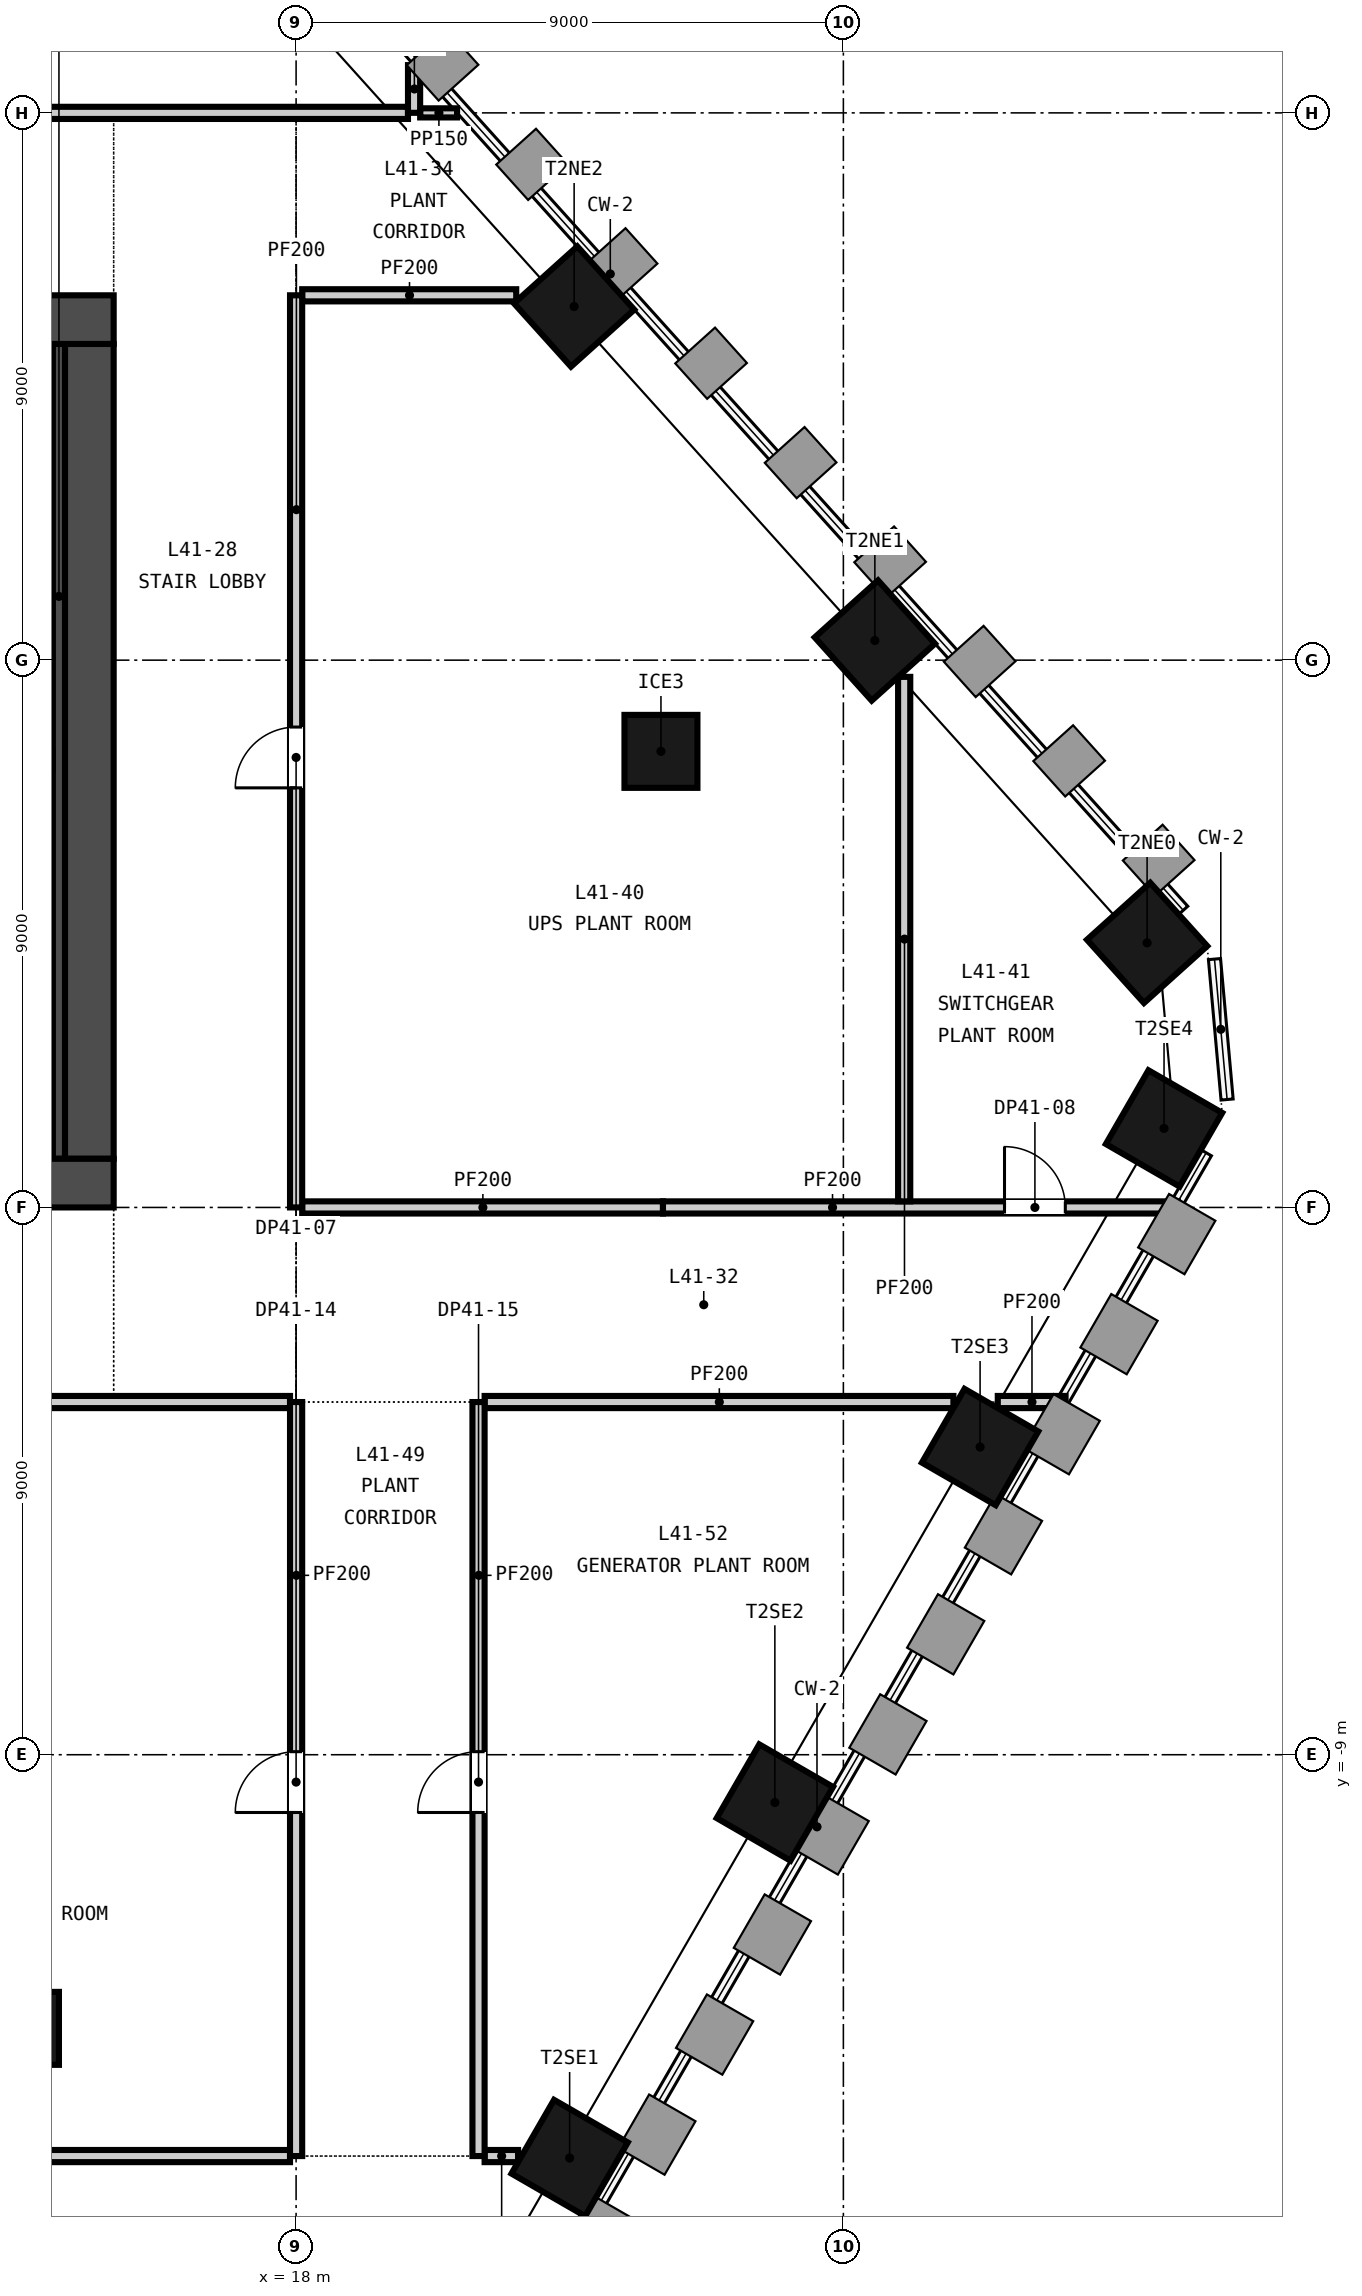
"""IFC4 building model, lengths in metres.
Left out: names, types, materials, properties, quantities, classifications, styles, units other than length and angle.
Written with IfcOpenShell. Run it as: python <this file> out.ifc"""

import sys

from ifc_helpers import new_model, si_unit, direction, frame, frame_2d, origin, origin_2d, place, context, subcontext, project, spatial, rectangle, extrude, element, fill, save


model = new_model("IFC4")
c1 = context("Model", 3, precision=1e-05, world=origin(), true_north=direction((0.0, 1.0)))
c2 = subcontext(c1, "Body", "Model", "MODEL_VIEW")
j1 = project(units=[si_unit("LENGTHUNIT", "METRE"), si_unit("PLANEANGLEUNIT", "RADIAN")], contexts=[c1])
p1 = place(None, origin())
s1 = spatial("IfcSite", under=j1, at=p1, CompositionType="ELEMENT")
p2 = place(p1, origin())
s2 = spatial("IfcBuilding", under=s1, at=p2, CompositionType="ELEMENT")
p3 = place(p2, frame((0.0, 0.0, 166.3)))
s3 = spatial("IfcBuildingStorey", under=s2, at=p3, CompositionType="ELEMENT", Elevation=166.3)
p4 = place(p3, frame((-15.0, 0.4, -0.3), z_axis=(0.0, 0.0, 1.0), x_axis=(1.0, 0.0, 0.0)))
e1 = element("IfcWall", 1, at=p4, inside=s3, PredefinedType="SOLIDWALL", context=c2, shape_type="SweptSolid", body=[
    extrude(rectangle(XDim=30.0, YDim=0.8, at=frame_2d((15.0, 0.0))), origin(), (0.0, 0.0, 1.0), 4.65),
])
p5 = place(p4, frame((5.8, 0.0, 0.3)))
e2 = element("IfcOpeningElement", 2, at=p5, cuts=e1, PredefinedType="OPENING", context=c2, shape_type="SweptSolid", body=[
    extrude(rectangle(XDim=2.4, YDim=2.4, at=frame_2d((1.2, 1.2))), frame((0.0, 0.41, 0.0), z_axis=(0.0, -1.0, 0.0), x_axis=(1.0, 0.0, 0.0)), (0.0, 0.0, 1.0), 0.82),
])
p6 = place(p4, frame((13.8, 0.0, 0.3)))
e3 = element("IfcOpeningElement", 3, at=p6, cuts=e1, PredefinedType="OPENING", context=c2, shape_type="SweptSolid", body=[
    extrude(rectangle(XDim=2.4, YDim=2.4, at=frame_2d((1.2, 1.2))), frame((0.0, 0.41, 0.0), z_axis=(0.0, -1.0, 0.0), x_axis=(1.0, 0.0, 0.0)), (0.0, 0.0, 1.0), 0.82),
])
p7 = place(p4, frame((21.8, 0.0, 0.3)))
e4 = element("IfcOpeningElement", 4, at=p7, cuts=e1, PredefinedType="OPENING", context=c2, shape_type="SweptSolid", body=[
    extrude(rectangle(XDim=2.4, YDim=2.4, at=frame_2d((1.2, 1.2))), frame((0.0, 0.41, 0.0), z_axis=(0.0, -1.0, 0.0), x_axis=(1.0, 0.0, 0.0)), (0.0, 0.0, 1.0), 0.82),
])
p8 = place(p4, frame((1.5, 0.0, 0.3)))
e5 = element("IfcOpeningElement", 5, at=p8, cuts=e1, PredefinedType="OPENING", context=c2, shape_type="SweptSolid", body=[
    extrude(rectangle(XDim=1.2, YDim=2.1, at=frame_2d((0.6, 1.05))), frame((0.0, 0.41, 0.0), z_axis=(0.0, -1.0, 0.0), x_axis=(1.0, 0.0, 0.0)), (0.0, 0.0, 1.0), 0.82),
])
p9 = place(p4, frame((27.3, 0.0, 0.3)))
e6 = element("IfcOpeningElement", 6, at=p9, cuts=e1, PredefinedType="OPENING", context=c2, shape_type="SweptSolid", body=[
    extrude(rectangle(XDim=1.2, YDim=2.1, at=frame_2d((0.6, 1.05))), frame((0.0, 0.41, 0.0), z_axis=(0.0, -1.0, 0.0), x_axis=(1.0, 0.0, 0.0)), (0.0, 0.0, 1.0), 0.82),
])
p10 = place(p3, frame((-15.0, 14.6, -0.3), z_axis=(0.0, 0.0, 1.0), x_axis=(1.0, 0.0, 0.0)))
e7 = element("IfcWall", 7, at=p10, inside=s3, PredefinedType="SOLIDWALL", context=c2, shape_type="SweptSolid", body=[
    extrude(rectangle(XDim=30.0, YDim=0.8, at=frame_2d((15.0, 0.0))), origin(), (0.0, 0.0, 1.0), 4.65),
])
p11 = place(p10, frame((9.25, 0.0, 0.3)))
e8 = element("IfcOpeningElement", 8, at=p11, cuts=e7, PredefinedType="OPENING", context=c2, shape_type="SweptSolid", body=[
    extrude(rectangle(XDim=1.5, YDim=2.1, at=frame_2d((0.75, 1.05))), frame((0.0, 0.41, 0.0), z_axis=(0.0, -1.0, 0.0), x_axis=(1.0, 0.0, 0.0)), (0.0, 0.0, 1.0), 0.82),
])
p12 = place(p10, frame((19.4, 0.0, 0.3)))
e9 = element("IfcOpeningElement", 9, at=p12, cuts=e7, PredefinedType="OPENING", context=c2, shape_type="SweptSolid", body=[
    extrude(rectangle(XDim=1.5, YDim=2.1, at=frame_2d((0.75, 1.05))), frame((0.0, 0.41, 0.0), z_axis=(0.0, -1.0, 0.0), x_axis=(1.0, 0.0, 0.0)), (0.0, 0.0, 1.0), 0.82),
])
p13 = place(p10, frame((1.5, 0.0, 0.3)))
e10 = element("IfcOpeningElement", 10, at=p13, cuts=e7, PredefinedType="OPENING", context=c2, shape_type="SweptSolid", body=[
    extrude(rectangle(XDim=1.2, YDim=2.1, at=frame_2d((0.6, 1.05))), frame((0.0, 0.41, 0.0), z_axis=(0.0, -1.0, 0.0), x_axis=(1.0, 0.0, 0.0)), (0.0, 0.0, 1.0), 0.82),
])
p14 = place(p10, frame((27.3, 0.0, 0.3)))
e11 = element("IfcOpeningElement", 11, at=p14, cuts=e7, PredefinedType="OPENING", context=c2, shape_type="SweptSolid", body=[
    extrude(rectangle(XDim=1.2, YDim=2.1, at=frame_2d((0.6, 1.05))), frame((0.0, 0.41, 0.0), z_axis=(0.0, -1.0, 0.0), x_axis=(1.0, 0.0, 0.0)), (0.0, 0.0, 1.0), 0.82),
])
p15 = place(p3, frame((14.6, 0.8, -0.3), z_axis=(0.0, 0.0, 1.0), x_axis=(0.0, 1.0, 0.0)))
e12 = element("IfcWall", 12, at=p15, inside=s3, PredefinedType="SOLIDWALL", context=c2, shape_type="SweptSolid", body=[
    extrude(rectangle(XDim=13.4, YDim=0.8, at=frame_2d((6.7, 0.0))), origin(), (0.0, 0.0, 1.0), 4.65),
])
for number, where, z_axis, x_axis in (
    (13, (22.498, -15.632, -0.3), (0.0, 0.0, 1.0), (0.5, 0.866, 0.0)),
    (14, (25.873, -9.786, -0.3), (0.0, 0.0, 1.0), (0.5, 0.866, 0.0)),
    (15, (29.248, -3.94, -0.3), (0.0, 0.0, 1.0), (0.5, 0.866, 0.0)),
    (16, (32.273, 1.299, -0.3), (0.0, 0.0, 1.0), (0.5, 0.866, 0.0)),
    (17, (31.995, 4.351, -0.3), (0.0, 0.0, 1.0), (-0.669, 0.743, 0.0)),
    (18, (27.518, 9.323, -0.3), (0.0, 0.0, 1.0), (-0.669, 0.743, 0.0)),
    (19, (22.573, 14.816, -0.3), (0.0, 0.0, 1.0), (-0.669, 0.743, 0.0)),
):
    element("IfcColumn", number, at=place(p3, frame(where, z_axis=z_axis, x_axis=x_axis)), inside=s3, PredefinedType="COLUMN", context=c2, shape_type="SweptSolid", body=[
        extrude(rectangle(XDim=1.4, YDim=1.4, at=origin_2d()), origin(), (0.0, 0.0, 1.0), 4.65),
    ])
for number, where, z_axis, x_axis in (
    (20, (13.5, -13.5, -0.3), (0.0, 0.0, 1.0), (1.0, 0.0, 0.0)),
    (21, (24.0, 7.5, -0.3), (0.0, 0.0, 1.0), (1.0, 0.0, 0.0)),
):
    element("IfcColumn", number, at=place(p3, frame(where, z_axis=z_axis, x_axis=x_axis)), inside=s3, PredefinedType="COLUMN", context=c2, shape_type="SweptSolid", body=[
        extrude(rectangle(XDim=1.2, YDim=1.2, at=origin_2d()), origin(), (0.0, 0.0, 1.0), 4.65),
    ])
p16 = place(p3, frame((11.05, 7.35, 0.0), z_axis=(0.0, 0.0, 1.0), x_axis=(1.0, 0.0, 0.0)))
e22 = element("IfcWall", 22, at=p16, inside=s3, PredefinedType="SOLIDWALL", context=c2, shape_type="SweptSolid", body=[
    extrude(rectangle(XDim=2.95, YDim=0.3, at=frame_2d((1.475, 0.0))), origin(), (0.0, 0.0, 1.0), 4.35),
])
p17 = place(p3, frame((14.1, 0.8, 0.0), z_axis=(0.0, 0.0, 1.0), x_axis=(0.0, 1.0, 0.0)))
e23 = element("IfcWall", 23, at=p17, inside=s3, PredefinedType="SOLIDWALL", context=c2, shape_type="SweptSolid", body=[
    extrude(rectangle(XDim=13.4, YDim=0.2, at=frame_2d((6.7, 0.0))), origin(), (0.0, 0.0, 1.0), 4.35),
])
p18 = place(p3, frame((9.03, -15.6, 0.0), z_axis=(0.0, 0.0, 1.0), x_axis=(1.0, 0.0, 0.0)))
e24 = element("IfcWall", 24, at=p18, inside=s3, PredefinedType="PARTITIONING", context=c2, shape_type="SweptSolid", body=[
    extrude(rectangle(XDim=8.87, YDim=0.2, at=frame_2d((4.435, 0.0))), origin(), (0.0, 0.0, 1.0), 4.35),
])
p19 = place(p3, frame((21.1, -15.6, 0.0), z_axis=(0.0, 0.0, 1.0), x_axis=(1.0, 0.0, 0.0)))
e25 = element("IfcWall", 25, at=p19, inside=s3, PredefinedType="PARTITIONING", context=c2, shape_type="SweptSolid", body=[
    extrude(rectangle(XDim=0.551, YDim=0.2, at=frame_2d((0.275, 0.0))), origin(), (0.0, 0.0, 1.0), 4.35),
])
p20 = place(p3, frame((9.1, -3.2, 0.0), z_axis=(0.0, 0.0, 1.0), x_axis=(1.0, 0.0, 0.0)))
e26 = element("IfcWall", 26, at=p20, inside=s3, PredefinedType="PARTITIONING", context=c2, shape_type="SweptSolid", body=[
    extrude(rectangle(XDim=8.8, YDim=0.2, at=frame_2d((4.4, 0.0))), origin(), (0.0, 0.0, 1.0), 4.35),
])
p21 = place(p3, frame((21.1, -3.2, 0.0), z_axis=(0.0, 0.0, 1.0), x_axis=(1.0, 0.0, 0.0)))
e27 = element("IfcWall", 27, at=p21, inside=s3, PredefinedType="PARTITIONING", context=c2, shape_type="SweptSolid", body=[
    extrude(rectangle(XDim=7.71, YDim=0.2, at=frame_2d((3.855, 0.0))), origin(), (0.0, 0.0, 1.0), 4.35),
])
p22 = place(p3, frame((29.539, -3.2, 0.0), z_axis=(0.0, 0.0, 1.0), x_axis=(1.0, 0.0, 0.0)))
e28 = element("IfcWall", 28, at=p22, inside=s3, PredefinedType="PARTITIONING", context=c2, shape_type="SweptSolid", body=[
    extrude(rectangle(XDim=1.115, YDim=0.2, at=frame_2d((0.557, 0.0))), origin(), (0.0, 0.0, 1.0), 3.6),
])
p23 = place(p3, frame((18.1, 0.0, 0.0), z_axis=(0.0, 0.0, 1.0), x_axis=(1.0, 0.0, 0.0)))
e29 = element("IfcWall", 29, at=p23, inside=s3, PredefinedType="PARTITIONING", context=c2, shape_type="SweptSolid", body=[
    extrude(rectangle(XDim=5.933, YDim=0.2, at=frame_2d((2.967, 0.0))), origin(), (0.0, 0.0, 1.0), 4.35),
])
p24 = place(p3, frame((24.033, 0.0, 0.0), z_axis=(0.0, 0.0, 1.0), x_axis=(1.0, 0.0, 0.0)))
e30 = element("IfcWall", 30, at=p24, inside=s3, PredefinedType="PARTITIONING", context=c2, shape_type="SweptSolid", body=[
    extrude(rectangle(XDim=8.469, YDim=0.2, at=frame_2d((4.234, 0.0))), origin(), (0.0, 0.0, 1.0), 3.6),
])
p25 = place(p24, frame((5.617, 0.0, 0.0)))
e31 = element("IfcOpeningElement", 31, at=p25, cuts=e30, PredefinedType="OPENING", context=c2, shape_type="SweptSolid", body=[
    extrude(rectangle(XDim=1.0, YDim=2.1, at=frame_2d((0.5, 1.05))), frame((0.0, 0.11, 0.0), z_axis=(0.0, -1.0, 0.0), x_axis=(1.0, 0.0, 0.0)), (0.0, 0.0, 1.0), 0.22),
])
p26 = place(p3, frame((18.1, 15.0, 0.0), z_axis=(0.0, 0.0, 1.0), x_axis=(1.0, 0.0, 0.0)))
e32 = element("IfcWall", 32, at=p26, inside=s3, PredefinedType="PARTITIONING", context=c2, shape_type="SweptSolid", body=[
    extrude(rectangle(XDim=3.52, YDim=0.2, at=frame_2d((1.76, 0.0))), origin(), (0.0, 0.0, 1.0), 4.35),
])
p27 = place(p3, frame((-22.003, 18.0, 0.0), z_axis=(0.0, 0.0, 1.0), x_axis=(1.0, 0.0, 0.0)))
e33 = element("IfcWall", 33, at=p27, inside=s3, PredefinedType="PARTITIONING", context=c2, shape_type="SweptSolid", body=[
    extrude(rectangle(XDim=41.843, YDim=0.2, at=frame_2d((20.921, 0.0))), origin(), (0.0, 0.0, 1.0), 4.35),
])
p28 = place(p27, frame((1.4, 0.0, 0.0)))
e34 = element("IfcOpeningElement", 34, at=p28, cuts=e33, PredefinedType="OPENING", context=c2, shape_type="SweptSolid", body=[
    extrude(rectangle(XDim=1.0, YDim=2.1, at=frame_2d((0.5, 1.05))), frame((0.0, 0.11, 0.0), z_axis=(0.0, -1.0, 0.0), x_axis=(1.0, 0.0, 0.0)), (0.0, 0.0, 1.0), 0.22),
])
p29 = place(p27, frame((12.052, 0.0, 0.0)))
e35 = element("IfcOpeningElement", 35, at=p29, cuts=e33, PredefinedType="OPENING", context=c2, shape_type="SweptSolid", body=[
    extrude(rectangle(XDim=1.0, YDim=2.1, at=frame_2d((0.5, 1.05))), frame((0.0, 0.11, 0.0), z_axis=(0.0, -1.0, 0.0), x_axis=(1.0, 0.0, 0.0)), (0.0, 0.0, 1.0), 0.22),
])
p30 = place(p27, frame((22.802, 0.0, 0.0)))
e36 = element("IfcOpeningElement", 36, at=p30, cuts=e33, PredefinedType="OPENING", context=c2, shape_type="SweptSolid", body=[
    extrude(rectangle(XDim=1.0, YDim=2.1, at=frame_2d((0.5, 1.05))), frame((0.0, 0.11, 0.0), z_axis=(0.0, -1.0, 0.0), x_axis=(1.0, 0.0, 0.0)), (0.0, 0.0, 1.0), 0.22),
])
p31 = place(p27, frame((33.092, 0.0, 0.0)))
e37 = element("IfcOpeningElement", 37, at=p31, cuts=e33, PredefinedType="OPENING", context=c2, shape_type="SweptSolid", body=[
    extrude(rectangle(XDim=1.0, YDim=2.1, at=frame_2d((0.5, 1.05))), frame((0.0, 0.11, 0.0), z_axis=(0.0, -1.0, 0.0), x_axis=(1.0, 0.0, 0.0)), (0.0, 0.0, 1.0), 0.22),
])
p32 = place(p3, frame((20.04, 18.0, 0.0), z_axis=(0.0, 0.0, 1.0), x_axis=(1.0, 0.0, 0.0)))
e38 = element("IfcWall", 38, at=p32, inside=s3, PredefinedType="PARTITIONING", context=c2, shape_type="SweptSolid", body=[
    extrude(rectangle(XDim=0.607, YDim=0.15, at=frame_2d((0.304, 0.0))), origin(), (0.0, 0.0, 1.0), 3.6),
])
p33 = place(p3, frame((18.0, -15.6, 0.0), z_axis=(0.0, 0.0, 1.0), x_axis=(0.0, 1.0, 0.0)))
e39 = element("IfcWall", 39, at=p33, inside=s3, PredefinedType="PARTITIONING", context=c2, shape_type="SweptSolid", body=[
    extrude(rectangle(XDim=12.4, YDim=0.2, at=frame_2d((6.2, 0.0))), origin(), (0.0, 0.0, 1.0), 4.35),
])
p34 = place(p33, frame((5.65, 0.0, 0.0)))
e40 = element("IfcOpeningElement", 40, at=p34, cuts=e39, PredefinedType="OPENING", context=c2, shape_type="SweptSolid", body=[
    extrude(rectangle(XDim=1.0, YDim=2.1, at=frame_2d((0.5, 1.05))), frame((0.0, 0.11, 0.0), z_axis=(0.0, -1.0, 0.0), x_axis=(1.0, 0.0, 0.0)), (0.0, 0.0, 1.0), 0.22),
])
p35 = place(p3, frame((18.0, 0.0, 0.0), z_axis=(0.0, 0.0, 1.0), x_axis=(0.0, 1.0, 0.0)))
e41 = element("IfcWall", 41, at=p35, inside=s3, PredefinedType="PARTITIONING", context=c2, shape_type="SweptSolid", body=[
    extrude(rectangle(XDim=15.0, YDim=0.2, at=frame_2d((7.5, 0.0))), origin(), (0.0, 0.0, 1.0), 4.35),
])
p36 = place(p35, frame((6.9, 0.0, 0.0)))
e42 = element("IfcOpeningElement", 42, at=p36, cuts=e41, PredefinedType="OPENING", context=c2, shape_type="SweptSolid", body=[
    extrude(rectangle(XDim=1.0, YDim=2.1, at=frame_2d((0.5, 1.05))), frame((0.0, 0.11, 0.0), z_axis=(0.0, -1.0, 0.0), x_axis=(1.0, 0.0, 0.0)), (0.0, 0.0, 1.0), 0.22),
])
p37 = place(p3, frame((19.94, 18.001, 0.0), z_axis=(0.0, 0.0, 1.0), x_axis=(0.0, 1.0, 0.0)))
e43 = element("IfcWall", 43, at=p37, inside=s3, PredefinedType="PARTITIONING", context=c2, shape_type="SweptSolid", body=[
    extrude(rectangle(XDim=0.784, YDim=0.2, at=frame_2d((0.392, 0.0))), origin(), (0.0, 0.0, 1.0), 3.6),
])
p38 = place(p3, frame((21.0, -15.6, 0.0), z_axis=(0.0, 0.0, 1.0), x_axis=(0.0, 1.0, 0.0)))
e44 = element("IfcWall", 44, at=p38, inside=s3, PredefinedType="PARTITIONING", context=c2, shape_type="SweptSolid", body=[
    extrude(rectangle(XDim=12.4, YDim=0.2, at=frame_2d((6.2, 0.0))), origin(), (0.0, 0.0, 1.0), 4.35),
])
p39 = place(p38, frame((5.65, 0.0, 0.0)))
e45 = element("IfcOpeningElement", 45, at=p39, cuts=e44, PredefinedType="OPENING", context=c2, shape_type="SweptSolid", body=[
    extrude(rectangle(XDim=1.0, YDim=2.1, at=frame_2d((0.5, 1.05))), frame((0.0, 0.11, 0.0), z_axis=(0.0, -1.0, 0.0), x_axis=(1.0, 0.0, 0.0)), (0.0, 0.0, 1.0), 0.22),
])
p40 = place(p3, frame((28.0, 0.1, 0.0), z_axis=(0.0, 0.0, 1.0), x_axis=(0.0, 1.0, 0.0)))
e46 = element("IfcWall", 46, at=p40, inside=s3, PredefinedType="PARTITIONING", context=c2, shape_type="SweptSolid", body=[
    extrude(rectangle(XDim=8.625, YDim=0.2, at=frame_2d((4.312, 0.0))), origin(), (0.0, 0.0, 1.0), 4.35),
])
p41 = place(p36, origin())
e47 = element("IfcDoor", 47, at=p41, inside=s3, OperationType="SINGLE_SWING_LEFT", PredefinedType="DOOR", context=c2, shape_type="SweptSolid", body=[
    extrude(rectangle(XDim=1.0, YDim=2.1, at=frame_2d((0.5, 1.05))), frame((0.0, 0.025, 0.0), z_axis=(0.0, -1.0, 0.0), x_axis=(1.0, 0.0, 0.0)), (0.0, 0.0, 1.0), 0.05),
])
fill(e42, e47)
p42 = place(p25, origin())
e48 = element("IfcDoor", 48, at=p42, inside=s3, OperationType="SINGLE_SWING_LEFT", PredefinedType="DOOR", context=c2, shape_type="SweptSolid", body=[
    extrude(rectangle(XDim=1.0, YDim=2.1, at=frame_2d((0.5, 1.05))), frame((0.0, 0.025, 0.0), z_axis=(0.0, -1.0, 0.0), x_axis=(1.0, 0.0, 0.0)), (0.0, 0.0, 1.0), 0.05),
])
fill(e31, e48)
p43 = place(p34, origin())
e49 = element("IfcDoor", 49, at=p43, inside=s3, OperationType="SINGLE_SWING_LEFT", PredefinedType="DOOR", context=c2, shape_type="SweptSolid", body=[
    extrude(rectangle(XDim=1.0, YDim=2.1, at=frame_2d((0.5, 1.05))), frame((0.0, 0.025, 0.0), z_axis=(0.0, -1.0, 0.0), x_axis=(1.0, 0.0, 0.0)), (0.0, 0.0, 1.0), 0.05),
])
fill(e40, e49)
p44 = place(p39, origin())
e50 = element("IfcDoor", 50, at=p44, inside=s3, OperationType="SINGLE_SWING_LEFT", PredefinedType="DOOR", context=c2, shape_type="SweptSolid", body=[
    extrude(rectangle(XDim=1.0, YDim=2.1, at=frame_2d((0.5, 1.05))), frame((0.0, 0.025, 0.0), z_axis=(0.0, -1.0, 0.0), x_axis=(1.0, 0.0, 0.0)), (0.0, 0.0, 1.0), 0.05),
])
fill(e45, e50)
save(model, sys.argv[1])
